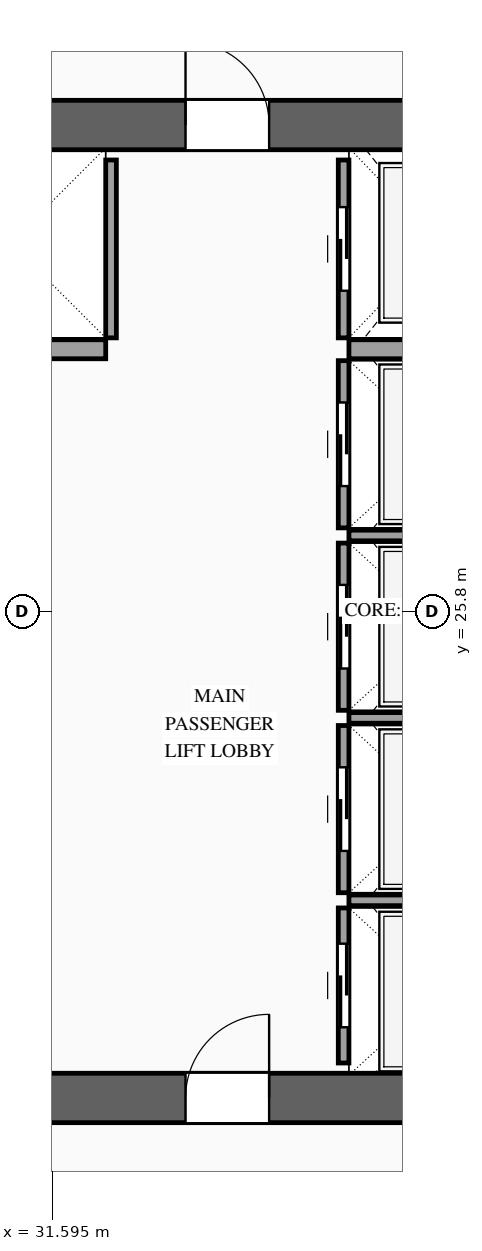
"""IFC4 building model, lengths in metres.
Left out: names, types, materials, properties, quantities, classifications, styles, units other than length and angle.
Written with IfcOpenShell. Run it as: python <this file> out.ifc"""

import sys

from ifc_helpers import new_model, si_unit, direction, frame, frame_2d, origin, place, context, subcontext, project, spatial, rectangle, extrude, source, transform, mapped, element, fill, save


model = new_model("IFC4")
c1 = context("Model", 3, precision=1e-05, world=origin(), true_north=direction((0.0, 1.0)))
c2 = subcontext(c1, "Body", "Model", "MODEL_VIEW")
j1 = project(units=[si_unit("LENGTHUNIT", "METRE"), si_unit("PLANEANGLEUNIT", "RADIAN")], contexts=[c1])
p1 = place(None, origin())
s1 = spatial("IfcSite", under=j1, at=p1, CompositionType="ELEMENT")
p2 = place(p1, origin())
s2 = spatial("IfcBuilding", under=s1, at=p2, CompositionType="ELEMENT")
p3 = place(p2, frame((0.0, 0.0, 176.4)))
s3 = spatial("IfcBuildingStorey", under=s2, at=p3, CompositionType="ELEMENT", Elevation=176.4)
p4 = place(p3, frame((23.475, 19.4, 0.0), z_axis=(0.0, 0.0, 1.0), x_axis=(1.0, 0.0, 0.0)))
e1 = element("IfcWall", 1, at=p4, inside=s3, PredefinedType="SHEAR", context=c2, shape_type="SweptSolid", body=[
    extrude(rectangle(XDim=27.05, YDim=0.65, at=frame_2d((13.525, 0.0))), origin(), (0.0, 0.0, 1.0), 4.6),
])
p5 = place(p4, frame((1.975, 0.0, 0.0)))
e2 = element("IfcOpeningElement", 2, at=p5, cuts=e1, PredefinedType="OPENING", context=c2, shape_type="SweptSolid", body=[
    extrude(rectangle(XDim=1.1, YDim=2.2, at=frame_2d((0.55, 1.1))), frame((0.0, 0.34, 0.0), z_axis=(0.0, -1.0, 0.0), x_axis=(1.0, 0.0, 0.0)), (0.0, 0.0, 1.0), 0.68),
])
p6 = place(p4, frame((9.875, 0.0, 0.0)))
e3 = element("IfcOpeningElement", 3, at=p6, cuts=e1, PredefinedType="OPENING", context=c2, shape_type="SweptSolid", body=[
    extrude(rectangle(XDim=1.1, YDim=2.2, at=frame_2d((0.55, 1.1))), frame((0.0, 0.34, 0.0), z_axis=(0.0, -1.0, 0.0), x_axis=(1.0, 0.0, 0.0)), (0.0, 0.0, 1.0), 0.68),
])
p7 = place(p4, frame((23.075, 0.0, 0.0)))
e4 = element("IfcOpeningElement", 4, at=p7, cuts=e1, PredefinedType="OPENING", context=c2, shape_type="SweptSolid", body=[
    extrude(rectangle(XDim=1.1, YDim=2.2, at=frame_2d((0.55, 1.1))), frame((0.0, 0.34, 0.0), z_axis=(0.0, -1.0, 0.0), x_axis=(1.0, 0.0, 0.0)), (0.0, 0.0, 1.0), 0.68),
])
p8 = place(p4, frame((19.695, 0.0, 0.0)))
e5 = element("IfcOpeningElement", 5, at=p8, cuts=e1, PredefinedType="OPENING", context=c2, shape_type="SweptSolid", body=[
    extrude(rectangle(XDim=0.9, YDim=2.15, at=frame_2d((0.45, 1.075))), frame((0.0, 0.34, 0.0), z_axis=(0.0, -1.0, 0.0), x_axis=(1.0, 0.0, 0.0)), (0.0, 0.0, 1.0), 0.68),
])
p9 = place(p3, frame((23.475, 32.2, 0.0), z_axis=(0.0, 0.0, 1.0), x_axis=(1.0, 0.0, 0.0)))
e6 = element("IfcWall", 6, at=p9, inside=s3, PredefinedType="SHEAR", context=c2, shape_type="SweptSolid", body=[
    extrude(rectangle(XDim=27.05, YDim=0.65, at=frame_2d((13.525, 0.0))), origin(), (0.0, 0.0, 1.0), 4.6),
])
p10 = place(p9, frame((4.595, 0.0, 0.0)))
e7 = element("IfcOpeningElement", 7, at=p10, cuts=e6, PredefinedType="OPENING", context=c2, shape_type="SweptSolid", body=[
    extrude(rectangle(XDim=0.9, YDim=2.15, at=frame_2d((0.45, 1.075))), frame((0.0, 0.34, 0.0), z_axis=(0.0, -1.0, 0.0), x_axis=(1.0, 0.0, 0.0)), (0.0, 0.0, 1.0), 0.68),
])
p11 = place(p9, frame((9.875, 0.0, 0.0)))
e8 = element("IfcOpeningElement", 8, at=p11, cuts=e6, PredefinedType="OPENING", context=c2, shape_type="SweptSolid", body=[
    extrude(rectangle(XDim=1.1, YDim=2.2, at=frame_2d((0.55, 1.1))), frame((0.0, 0.34, 0.0), z_axis=(0.0, -1.0, 0.0), x_axis=(1.0, 0.0, 0.0)), (0.0, 0.0, 1.0), 0.68),
])
p12 = place(p9, frame((15.725, 0.0, 0.0)))
e9 = element("IfcOpeningElement", 9, at=p12, cuts=e6, PredefinedType="OPENING", context=c2, shape_type="SweptSolid", body=[
    extrude(rectangle(XDim=1.1, YDim=2.2, at=frame_2d((0.55, 1.1))), frame((0.0, 0.34, 0.0), z_axis=(0.0, -1.0, 0.0), x_axis=(1.0, 0.0, 0.0)), (0.0, 0.0, 1.0), 0.68),
])
p13 = place(p9, frame((18.925, 0.0, 0.0)))
e10 = element("IfcOpeningElement", 10, at=p13, cuts=e6, PredefinedType="OPENING", context=c2, shape_type="SweptSolid", body=[
    extrude(rectangle(XDim=0.9, YDim=2.15, at=frame_2d((0.45, 1.075))), frame((0.0, 0.34, 0.0), z_axis=(0.0, -1.0, 0.0), x_axis=(1.0, 0.0, 0.0)), (0.0, 0.0, 1.0), 0.68),
])
m1 = source(origin(), c2, "Body", "SweptSolid", [
    extrude(rectangle(XDim=2.34, YDim=0.14, at=frame_2d((1.17, 0.0))), origin(), (0.0, 0.0, 1.0), 4.38),
])
p14 = place(p3, frame((32.37, 29.4, 0.0), z_axis=(0.0, 0.0, 1.0), x_axis=(0.0, 1.0, 0.0)))
e11 = element("IfcWall", 11, at=p14, inside=s3, PredefinedType="SOLIDWALL", context=c2, shape_type="MappedRepresentation", body=[
    mapped(m1, transform((0.0, 0.0, 0.0), scale=1.0)),
])
m2 = source(origin(), c2, "Body", "SweptSolid", [
    extrude(rectangle(XDim=2.5, YDim=0.25, at=frame_2d((1.25, 0.0))), origin(), (0.0, 0.0, 1.0), 4.38),
])
p15 = place(p3, frame((29.8, 29.25, 0.0), z_axis=(0.0, 0.0, 1.0), x_axis=(1.0, 0.0, 0.0)))
e12 = element("IfcWall", 12, at=p15, inside=s3, PredefinedType="SOLIDWALL", context=c2, shape_type="MappedRepresentation", body=[
    mapped(m2, transform((0.0, 0.0, 0.0), scale=1.0)),
])
p16 = place(p3, frame((35.43, 19.86, 0.0), z_axis=(0.0, 0.0, 1.0), x_axis=(0.0, 1.0, 0.0)))
e13 = element("IfcWall", 13, at=p16, inside=s3, PredefinedType="SOLIDWALL", context=c2, shape_type="SweptSolid", body=[
    extrude(rectangle(XDim=2.04, YDim=0.14, at=frame_2d((1.02, 0.0))), origin(), (0.0, 0.0, 1.0), 4.38),
])
p17 = place(p16, frame((0.47, 0.0, 0.0)))
e14 = element("IfcOpeningElement", 14, at=p17, cuts=e13, PredefinedType="OPENING", context=c2, shape_type="SweptSolid", body=[
    extrude(rectangle(XDim=1.1, YDim=2.2, at=frame_2d((0.55, 1.1))), frame((0.0, 0.085, 0.0), z_axis=(0.0, -1.0, 0.0), x_axis=(1.0, 0.0, 0.0)), (0.0, 0.0, 1.0), 0.17),
])
m3 = source(origin(), c2, "Body", "SweptSolid", [
    extrude(rectangle(XDim=2.4, YDim=0.14, at=frame_2d((1.2, 0.0))), origin(), (0.0, 0.0, 1.0), 4.38),
])
p18 = place(p3, frame((35.5, 22.0, 0.0), z_axis=(0.0, 0.0, 1.0), x_axis=(1.0, 0.0, 0.0)))
e15 = element("IfcWall", 15, at=p18, inside=s3, PredefinedType="SOLIDWALL", context=c2, shape_type="MappedRepresentation", body=[
    mapped(m3, transform((0.0, 0.0, 0.0), scale=1.0)),
])
p19 = place(p3, frame((35.43, 22.1, 0.0), z_axis=(0.0, 0.0, 1.0), x_axis=(0.0, 1.0, 0.0)))
e16 = element("IfcWall", 16, at=p19, inside=s3, PredefinedType="SOLIDWALL", context=c2, shape_type="SweptSolid", body=[
    extrude(rectangle(XDim=2.2, YDim=0.14, at=frame_2d((1.1, 0.0))), origin(), (0.0, 0.0, 1.0), 4.38),
])
p20 = place(p19, frame((0.55, 0.0, 0.0)))
e17 = element("IfcOpeningElement", 17, at=p20, cuts=e16, PredefinedType="OPENING", context=c2, shape_type="SweptSolid", body=[
    extrude(rectangle(XDim=1.1, YDim=2.2, at=frame_2d((0.55, 1.1))), frame((0.0, 0.085, 0.0), z_axis=(0.0, -1.0, 0.0), x_axis=(1.0, 0.0, 0.0)), (0.0, 0.0, 1.0), 0.17),
])
p21 = place(p3, frame((35.5, 24.4, 0.0), z_axis=(0.0, 0.0, 1.0), x_axis=(1.0, 0.0, 0.0)))
e18 = element("IfcWall", 18, at=p21, inside=s3, PredefinedType="SOLIDWALL", context=c2, shape_type="MappedRepresentation", body=[
    mapped(m3, transform((0.0, 0.0, 0.0), scale=1.0)),
])
p22 = place(p3, frame((35.43, 24.5, 0.0), z_axis=(0.0, 0.0, 1.0), x_axis=(0.0, 1.0, 0.0)))
e19 = element("IfcWall", 19, at=p22, inside=s3, PredefinedType="SOLIDWALL", context=c2, shape_type="SweptSolid", body=[
    extrude(rectangle(XDim=2.2, YDim=0.14, at=frame_2d((1.1, 0.0))), origin(), (0.0, 0.0, 1.0), 4.38),
])
p23 = place(p22, frame((0.55, 0.0, 0.0)))
e20 = element("IfcOpeningElement", 20, at=p23, cuts=e19, PredefinedType="OPENING", context=c2, shape_type="SweptSolid", body=[
    extrude(rectangle(XDim=1.1, YDim=2.2, at=frame_2d((0.55, 1.1))), frame((0.0, 0.085, 0.0), z_axis=(0.0, -1.0, 0.0), x_axis=(1.0, 0.0, 0.0)), (0.0, 0.0, 1.0), 0.17),
])
p24 = place(p3, frame((35.5, 26.8, 0.0), z_axis=(0.0, 0.0, 1.0), x_axis=(1.0, 0.0, 0.0)))
e21 = element("IfcWall", 21, at=p24, inside=s3, PredefinedType="SOLIDWALL", context=c2, shape_type="MappedRepresentation", body=[
    mapped(m3, transform((0.0, 0.0, 0.0), scale=1.0)),
])
p25 = place(p3, frame((35.43, 26.9, 0.0), z_axis=(0.0, 0.0, 1.0), x_axis=(0.0, 1.0, 0.0)))
e22 = element("IfcWall", 22, at=p25, inside=s3, PredefinedType="SOLIDWALL", context=c2, shape_type="SweptSolid", body=[
    extrude(rectangle(XDim=2.2, YDim=0.14, at=frame_2d((1.1, 0.0))), origin(), (0.0, 0.0, 1.0), 4.38),
])
p26 = place(p25, frame((0.55, 0.0, 0.0)))
e23 = element("IfcOpeningElement", 23, at=p26, cuts=e22, PredefinedType="OPENING", context=c2, shape_type="SweptSolid", body=[
    extrude(rectangle(XDim=1.1, YDim=2.2, at=frame_2d((0.55, 1.1))), frame((0.0, 0.085, 0.0), z_axis=(0.0, -1.0, 0.0), x_axis=(1.0, 0.0, 0.0)), (0.0, 0.0, 1.0), 0.17),
])
p27 = place(p3, frame((35.43, 29.4, 0.0), z_axis=(0.0, 0.0, 1.0), x_axis=(0.0, 1.0, 0.0)))
e24 = element("IfcWall", 24, at=p27, inside=s3, PredefinedType="SOLIDWALL", context=c2, shape_type="SweptSolid", body=[
    extrude(rectangle(XDim=2.34, YDim=0.14, at=frame_2d((1.17, 0.0))), origin(), (0.0, 0.0, 1.0), 4.38),
])
p28 = place(p27, frame((0.62, 0.0, 0.0)))
e25 = element("IfcOpeningElement", 25, at=p28, cuts=e24, PredefinedType="OPENING", context=c2, shape_type="SweptSolid", body=[
    extrude(rectangle(XDim=1.1, YDim=2.2, at=frame_2d((0.55, 1.1))), frame((0.0, 0.085, 0.0), z_axis=(0.0, -1.0, 0.0), x_axis=(1.0, 0.0, 0.0)), (0.0, 0.0, 1.0), 0.17),
])
m4 = source(origin(), c2, "Body", "SweptSolid", [
    extrude(rectangle(XDim=2.4, YDim=0.25, at=frame_2d((1.2, 0.0))), origin(), (0.0, 0.0, 1.0), 4.38),
])
p29 = place(p3, frame((35.5, 29.25, 0.0), z_axis=(0.0, 0.0, 1.0), x_axis=(1.0, 0.0, 0.0)))
e26 = element("IfcWall", 26, at=p29, inside=s3, PredefinedType="SOLIDWALL", context=c2, shape_type="MappedRepresentation", body=[
    mapped(m4, transform((0.0, 0.0, 0.0), scale=1.0)),
])
m5 = source(origin(), c2, "Body", "SweptSolid", [
    extrude(rectangle(XDim=1.1, YDim=2.2, at=frame_2d((0.55, 1.1))), frame((0.0, 0.025, 0.0), z_axis=(0.0, -1.0, 0.0), x_axis=(1.0, 0.0, 0.0)), (0.0, 0.0, 1.0), 0.05),
])
p30 = place(p17, origin())
e27 = element("IfcDoor", 27, at=p30, inside=s3, OperationType="SLIDING_TO_RIGHT", PredefinedType="DOOR", context=c2, shape_type="MappedRepresentation", body=[
    mapped(m5, transform((0.0, 0.0, 0.0), scale=1.0)),
])
fill(e14, e27)
p31 = place(p20, origin())
e28 = element("IfcDoor", 28, at=p31, inside=s3, OperationType="SLIDING_TO_LEFT", PredefinedType="DOOR", context=c2, shape_type="MappedRepresentation", body=[
    mapped(m5, transform((0.0, 0.0, 0.0), scale=1.0)),
])
fill(e17, e28)
p32 = place(p23, origin())
e29 = element("IfcDoor", 29, at=p32, inside=s3, OperationType="SLIDING_TO_RIGHT", PredefinedType="DOOR", context=c2, shape_type="MappedRepresentation", body=[
    mapped(m5, transform((0.0, 0.0, 0.0), scale=1.0)),
])
fill(e20, e29)
p33 = place(p26, origin())
e30 = element("IfcDoor", 30, at=p33, inside=s3, OperationType="SLIDING_TO_LEFT", PredefinedType="DOOR", context=c2, shape_type="MappedRepresentation", body=[
    mapped(m5, transform((0.0, 0.0, 0.0), scale=1.0)),
])
fill(e23, e30)
p34 = place(p28, origin())
e31 = element("IfcDoor", 31, at=p34, inside=s3, OperationType="SLIDING_TO_RIGHT", PredefinedType="DOOR", context=c2, shape_type="MappedRepresentation", body=[
    mapped(m5, transform((0.0, 0.0, 0.0), scale=1.0)),
])
fill(e25, e31)
m6 = source(origin(), c2, "Body", "SweptSolid", [
    extrude(rectangle(XDim=1.1, YDim=2.2, at=frame_2d((0.55, 1.1))), frame((0.0, 0.025, 0.0), z_axis=(0.0, -1.0, 0.0), x_axis=(1.0, 0.0, 0.0)), (0.0, 0.0, 1.0), 0.05),
])
p35 = place(p6, origin())
e32 = element("IfcDoor", 32, at=p35, inside=s3, OperationType="SINGLE_SWING_RIGHT", PredefinedType="DOOR", context=c2, shape_type="MappedRepresentation", body=[
    mapped(m6, transform((0.0, 0.0, 0.0), scale=1.0)),
])
fill(e3, e32)
p36 = place(p11, origin())
e33 = element("IfcDoor", 33, at=p36, inside=s3, OperationType="SINGLE_SWING_LEFT", PredefinedType="DOOR", context=c2, shape_type="MappedRepresentation", body=[
    mapped(m6, transform((0.0, 0.0, 0.0), scale=1.0)),
])
fill(e8, e33)
save(model, sys.argv[1])
